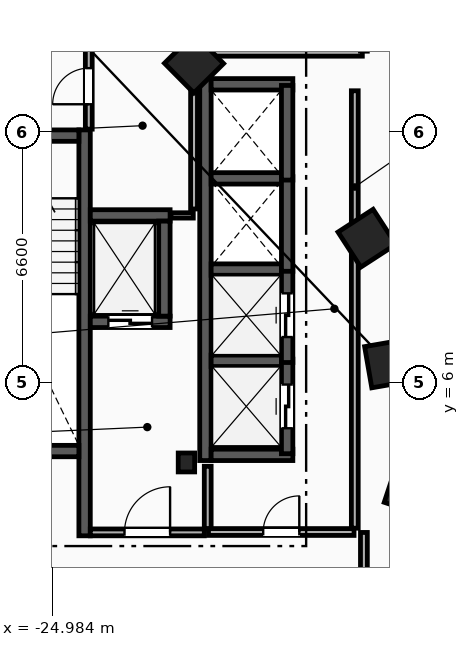
"""IFC4 building model, lengths in metres.
Left out: names, types, materials, properties, quantities, classifications, styles, units other than length and angle.
Written with IfcOpenShell. Run it as: python <this file> out.ifc"""

import sys

from ifc_helpers import new_model, si_unit, direction, frame, frame_2d, origin, origin_2d, place, context, subcontext, project, spatial, rectangle, i_section, extrude, element, fill, save


model = new_model("IFC4")
c1 = context("Model", 3, precision=1e-05, world=origin(), true_north=direction((0.0, 1.0)))
c2 = subcontext(c1, "Body", "Model", "MODEL_VIEW")
j1 = project(units=[si_unit("LENGTHUNIT", "METRE"), si_unit("PLANEANGLEUNIT", "RADIAN")], contexts=[c1])
p1 = place(None, origin())
s1 = spatial("IfcSite", under=j1, at=p1, CompositionType="ELEMENT")
p2 = place(p1, origin())
s2 = spatial("IfcBuilding", under=s1, at=p2, CompositionType="ELEMENT")
p3 = place(p2, frame((0.0, 0.0, 99.8)))
s3 = spatial("IfcBuildingStorey", under=s2, at=p3, CompositionType="ELEMENT", Elevation=99.8)
p4 = place(p3, frame((-21.45, 3.9, 0.0), z_axis=(0.0, 0.0, 1.0), x_axis=(1.0, 0.0, 0.0)))
e1 = element("IfcColumn", 1, at=p4, inside=s3, PredefinedType="COLUMN", context=c2, shape_type="SweptSolid", body=[
    extrude(i_section(OverallWidth=0.432, OverallDepth=0.498, WebThickness=0.056, FlangeThickness=0.089, FilletRadius=0.018, at=origin_2d()), origin(), (0.0, 0.0, 1.0), 3.6),
])
for number, where, z_axis, x_axis in (
    (2, (-15.55, 3.2, 0.0), (0.0, 0.0, 1.0), (0.315, 0.949, 0.0)),
    (3, (-16.125, 6.5, 0.0), (0.0, 0.0, 1.0), (-0.172, 0.985, 0.0)),
    (4, (-16.7, 9.8, 0.0), (0.0, 0.0, 1.0), (-0.544, 0.839, 0.0)),
    (5, (-21.25, 14.4, 0.0), (0.0, 0.0, 1.0), (-0.703, 0.711, 0.0)),
):
    element("IfcColumn", number, at=place(p3, frame(where, z_axis=z_axis, x_axis=x_axis)), inside=s3, PredefinedType="COLUMN", context=c2, shape_type="SweptSolid", body=[
        extrude(rectangle(XDim=1.1, YDim=1.1, at=origin_2d()), origin(), (0.0, 0.0, 1.0), 3.6),
    ])
p5 = place(p3, frame((-24.13, 1.97, 0.0), z_axis=(0.0, 0.0, 1.0), x_axis=(0.0, 1.0, 0.0)))
e6 = element("IfcWall", 6, at=p5, inside=s3, PredefinedType="SHEAR", context=c2, shape_type="SweptSolid", body=[
    extrude(rectangle(XDim=10.68, YDim=0.3, at=frame_2d((5.34, 0.0))), origin(), (0.0, 0.0, 1.0), 3.3),
])
p6 = place(p3, frame((-27.44, 12.5, 0.0), z_axis=(0.0, 0.0, 1.0), x_axis=(1.0, 0.0, 0.0)))
e7 = element("IfcWall", 7, at=p6, inside=s3, PredefinedType="SHEAR", context=c2, shape_type="SweptSolid", body=[
    extrude(rectangle(XDim=3.16, YDim=0.3, at=frame_2d((1.58, 0.0))), origin(), (0.0, 0.0, 1.0), 3.3),
])
p7 = place(p6, frame((1.03, 0.0, 0.0)))
e8 = element("IfcOpeningElement", 8, at=p7, cuts=e7, PredefinedType="OPENING", context=c2, shape_type="SweptSolid", body=[
    extrude(rectangle(XDim=1.1, YDim=2.15, at=frame_2d((0.55, 1.075))), frame((0.0, 0.16, 0.0), z_axis=(0.0, -1.0, 0.0), x_axis=(1.0, 0.0, 0.0)), (0.0, 0.0, 1.0), 0.32),
])
p8 = place(p3, frame((-27.44, 4.2, 0.0), z_axis=(0.0, 0.0, 1.0), x_axis=(1.0, 0.0, 0.0)))
e9 = element("IfcWall", 9, at=p8, inside=s3, PredefinedType="SHEAR", context=c2, shape_type="SweptSolid", body=[
    extrude(rectangle(XDim=3.16, YDim=0.3, at=frame_2d((1.58, 0.0))), origin(), (0.0, 0.0, 1.0), 3.3),
])
p9 = place(p3, frame((-20.89, 2.15, 0.0), z_axis=(0.0, 0.0, 1.0), x_axis=(0.0, 1.0, 0.0)))
e10 = element("IfcWall", 10, at=p9, inside=s3, PredefinedType="PARTITIONING", context=c2, shape_type="SweptSolid", body=[
    extrude(rectangle(XDim=1.65, YDim=0.18, at=frame_2d((0.825, 0.0))), origin(), (0.0, 0.0, 1.0), 3.3),
])
p10 = place(p3, frame((-23.98, 2.06, 0.0), z_axis=(0.0, 0.0, 1.0), x_axis=(1.0, 0.0, 0.0)))
e11 = element("IfcWall", 11, at=p10, inside=s3, PredefinedType="PARTITIONING", context=c2, shape_type="SweptSolid", body=[
    extrude(rectangle(XDim=3.0, YDim=0.18, at=frame_2d((1.5, 0.0))), origin(), (0.0, 0.0, 1.0), 3.3),
])
p11 = place(p10, frame((0.9, 0.0, 0.0)))
e12 = element("IfcOpeningElement", 12, at=p11, cuts=e11, PredefinedType="OPENING", context=c2, shape_type="SweptSolid", body=[
    extrude(rectangle(XDim=1.2, YDim=2.15, at=frame_2d((0.6, 1.075))), frame((0.0, 0.1, 0.0), z_axis=(0.0, -1.0, 0.0), x_axis=(1.0, 0.0, 0.0)), (0.0, 0.0, 1.0), 0.2),
])
p12 = place(p3, frame((-23.98, 7.6, 0.0), z_axis=(0.0, 0.0, 1.0), x_axis=(1.0, 0.0, 0.0)))
e13 = element("IfcWall", 13, at=p12, inside=s3, PredefinedType="SHEAR", context=c2, shape_type="SweptSolid", body=[
    extrude(rectangle(XDim=2.1, YDim=0.3, at=frame_2d((1.05, 0.0))), origin(), (0.0, 0.0, 1.0), 3.3),
])
p13 = place(p12, frame((0.475, 0.0, 0.0)))
e14 = element("IfcOpeningElement", 14, at=p13, cuts=e13, PredefinedType="OPENING", context=c2, shape_type="SweptSolid", body=[
    extrude(rectangle(XDim=1.15, YDim=2.2, at=frame_2d((0.575, 1.1))), frame((0.0, 0.16, 0.0), z_axis=(0.0, -1.0, 0.0), x_axis=(1.0, 0.0, 0.0)), (0.0, 0.0, 1.0), 0.32),
])
p14 = place(p3, frame((-23.98, 10.4, 0.0), z_axis=(0.0, 0.0, 1.0), x_axis=(1.0, 0.0, 0.0)))
e15 = element("IfcWall", 15, at=p14, inside=s3, PredefinedType="SHEAR", context=c2, shape_type="SweptSolid", body=[
    extrude(rectangle(XDim=2.1, YDim=0.3, at=frame_2d((1.05, 0.0))), origin(), (0.0, 0.0, 1.0), 3.3),
])
p15 = place(p3, frame((-22.03, 7.75, 0.0), z_axis=(0.0, 0.0, 1.0), x_axis=(0.0, 1.0, 0.0)))
e16 = element("IfcWall", 16, at=p15, inside=s3, PredefinedType="SHEAR", context=c2, shape_type="SweptSolid", body=[
    extrude(rectangle(XDim=2.5, YDim=0.3, at=frame_2d((1.25, 0.0))), origin(), (0.0, 0.0, 1.0), 3.3),
])
p16 = place(p3, frame((-20.95, 3.95, 0.0), z_axis=(0.0, 0.0, 1.0), x_axis=(0.0, 1.0, 0.0)))
e17 = element("IfcWall", 17, at=p16, inside=s3, PredefinedType="SHEAR", context=c2, shape_type="SweptSolid", body=[
    extrude(rectangle(XDim=10.05, YDim=0.3, at=frame_2d((5.025, 0.0))), origin(), (0.0, 0.0, 1.0), 3.3),
])
for number, where, z_axis, x_axis in (
    (18, (-20.8, 4.1, 0.0), (0.0, 0.0, 1.0), (1.0, 0.0, 0.0)),
    (19, (-20.8, 13.85, 0.0), (0.0, 0.0, 1.0), (1.0, 0.0, 0.0)),
):
    element("IfcWall", number, at=place(p3, frame(where, z_axis=z_axis, x_axis=x_axis)), inside=s3, PredefinedType="SHEAR", context=c2, shape_type="SweptSolid", body=[
        extrude(rectangle(XDim=2.15, YDim=0.3, at=frame_2d((1.075, 0.0))), origin(), (0.0, 0.0, 1.0), 3.3),
    ])
for number, where, z_axis, x_axis in (
    (20, (-20.8, 6.575, 0.0), (0.0, 0.0, 1.0), (1.0, 0.0, 0.0)),
    (21, (-20.8, 8.975, 0.0), (0.0, 0.0, 1.0), (1.0, 0.0, 0.0)),
    (22, (-20.8, 11.375, 0.0), (0.0, 0.0, 1.0), (1.0, 0.0, 0.0)),
):
    element("IfcWall", number, at=place(p3, frame(where, z_axis=z_axis, x_axis=x_axis)), inside=s3, PredefinedType="SHEAR", context=c2, shape_type="SweptSolid", body=[
        extrude(rectangle(XDim=1.85, YDim=0.3, at=frame_2d((0.925, 0.0))), origin(), (0.0, 0.0, 1.0), 3.3),
    ])
p17 = place(p3, frame((-18.8, 4.13, 0.0), z_axis=(0.0, 0.0, 1.0), x_axis=(0.0, 1.0, 0.0)))
e23 = element("IfcWall", 23, at=p17, inside=s3, PredefinedType="SHEAR", context=c2, shape_type="SweptSolid", body=[
    extrude(rectangle(XDim=2.49, YDim=0.3, at=frame_2d((1.245, 0.0))), origin(), (0.0, 0.0, 1.0), 3.3),
])
p18 = place(p17, frame((0.67, 0.0, 0.0)))
e24 = element("IfcOpeningElement", 24, at=p18, cuts=e23, PredefinedType="OPENING", context=c2, shape_type="SweptSolid", body=[
    extrude(rectangle(XDim=1.15, YDim=2.2, at=frame_2d((0.575, 1.1))), frame((0.0, 0.16, 0.0), z_axis=(0.0, -1.0, 0.0), x_axis=(1.0, 0.0, 0.0)), (0.0, 0.0, 1.0), 0.32),
])
p19 = place(p3, frame((-18.8, 6.53, 0.0), z_axis=(0.0, 0.0, 1.0), x_axis=(0.0, 1.0, 0.0)))
e25 = element("IfcWall", 25, at=p19, inside=s3, PredefinedType="SHEAR", context=c2, shape_type="SweptSolid", body=[
    extrude(rectangle(XDim=2.49, YDim=0.3, at=frame_2d((1.245, 0.0))), origin(), (0.0, 0.0, 1.0), 3.3),
])
p20 = place(p19, frame((0.67, 0.0, 0.0)))
e26 = element("IfcOpeningElement", 26, at=p20, cuts=e25, PredefinedType="OPENING", context=c2, shape_type="SweptSolid", body=[
    extrude(rectangle(XDim=1.15, YDim=2.2, at=frame_2d((0.575, 1.1))), frame((0.0, 0.16, 0.0), z_axis=(0.0, -1.0, 0.0), x_axis=(1.0, 0.0, 0.0)), (0.0, 0.0, 1.0), 0.32),
])
for number, where, z_axis, x_axis in (
    (27, (-18.8, 8.93, 0.0), (0.0, 0.0, 1.0), (0.0, 1.0, 0.0)),
    (28, (-18.8, 11.33, 0.0), (0.0, 0.0, 1.0), (0.0, 1.0, 0.0)),
):
    element("IfcWall", number, at=place(p3, frame(where, z_axis=z_axis, x_axis=x_axis)), inside=s3, PredefinedType="SHEAR", context=c2, shape_type="SweptSolid", body=[
        extrude(rectangle(XDim=2.49, YDim=0.3, at=frame_2d((1.245, 0.0))), origin(), (0.0, 0.0, 1.0), 3.3),
    ])
p21 = place(p3, frame((-17.02, 2.17, 0.0), z_axis=(0.0, 0.0, 1.0), x_axis=(0.0, 1.0, 0.0)))
e29 = element("IfcWall", 29, at=p21, inside=s3, PredefinedType="PARTITIONING", context=c2, shape_type="SweptSolid", body=[
    extrude(rectangle(XDim=11.51, YDim=0.18, at=frame_2d((5.755, 0.0))), origin(), (0.0, 0.0, 1.0), 3.3),
])
p22 = place(p3, frame((-20.87, 2.07, 0.0), z_axis=(0.0, 0.0, 1.0), x_axis=(1.0, 0.0, 0.0)))
e30 = element("IfcWall", 30, at=p22, inside=s3, PredefinedType="PARTITIONING", context=c2, shape_type="SweptSolid", body=[
    extrude(rectangle(XDim=3.83, YDim=0.18, at=frame_2d((1.915, 0.0))), origin(), (0.0, 0.0, 1.0), 3.3),
])
p23 = place(p22, frame((1.44, 0.0, 0.0)))
e31 = element("IfcOpeningElement", 31, at=p23, cuts=e30, PredefinedType="OPENING", context=c2, shape_type="SweptSolid", body=[
    extrude(rectangle(XDim=0.95, YDim=2.1, at=frame_2d((0.475, 1.05))), frame((0.0, 0.1, 0.0), z_axis=(0.0, -1.0, 0.0), x_axis=(1.0, 0.0, 0.0)), (0.0, 0.0, 1.0), 0.2),
])
p24 = place(p3, frame((-21.86, 10.4, 0.0), z_axis=(0.0, 0.0, 1.0), x_axis=(1.0, 0.0, 0.0)))
e32 = element("IfcWall", 32, at=p24, inside=s3, PredefinedType="PARTITIONING", context=c2, shape_type="SweptSolid", body=[
    extrude(rectangle(XDim=0.59, YDim=0.14, at=frame_2d((0.295, 0.0))), origin(), (0.0, 0.0, 1.0), 3.3),
])
p25 = place(p3, frame((-21.25, 10.57, 0.0), z_axis=(0.0, 0.0, 1.0), x_axis=(0.0, 1.0, 0.0)))
e33 = element("IfcWall", 33, at=p25, inside=s3, PredefinedType="PARTITIONING", context=c2, shape_type="SweptSolid", body=[
    extrude(rectangle(XDim=4.36, YDim=0.18, at=frame_2d((2.18, 0.0))), origin(), (0.0, 0.0, 1.0), 3.3),
])
p26 = place(p3, frame((-24.02, 12.67, 0.0), z_axis=(0.0, 0.0, 1.0), x_axis=(0.0, 1.0, 0.0)))
e34 = element("IfcWall", 34, at=p26, inside=s3, PredefinedType="PARTITIONING", context=c2, shape_type="SweptSolid", body=[
    extrude(rectangle(XDim=2.26, YDim=0.18, at=frame_2d((1.13, 0.0))), origin(), (0.0, 0.0, 1.0), 3.3),
])
p27 = place(p26, frame((0.655, 0.0, 0.0)))
e35 = element("IfcOpeningElement", 35, at=p27, cuts=e34, PredefinedType="OPENING", context=c2, shape_type="SweptSolid", body=[
    extrude(rectangle(XDim=0.95, YDim=2.1, at=frame_2d((0.475, 1.05))), frame((0.0, 0.1, 0.0), z_axis=(0.0, -1.0, 0.0), x_axis=(1.0, 0.0, 0.0)), (0.0, 0.0, 1.0), 0.2),
])
p28 = place(p3, frame((-21.178, 14.68, 0.0), z_axis=(0.0, 0.0, 1.0), x_axis=(1.0, 0.0, 0.0)))
e36 = element("IfcWall", 36, at=p28, inside=s3, PredefinedType="PARTITIONING", context=c2, shape_type="SweptSolid", body=[
    extrude(rectangle(XDim=4.357, YDim=0.18, at=frame_2d((2.178, 0.0))), origin(), (0.0, 0.0, 1.0), 3.3),
])
p29 = place(p3, frame((-16.78, -0.329, 0.0), z_axis=(0.0, 0.0, 1.0), x_axis=(0.0, 1.0, 0.0)))
e37 = element("IfcWall", 37, at=p29, inside=s3, PredefinedType="PARTITIONING", context=c2, shape_type="SweptSolid", body=[
    extrude(rectangle(XDim=2.387, YDim=0.18, at=frame_2d((1.194, 0.0))), origin(), (0.0, 0.0, 1.0), 3.3),
])
p30 = place(p11, origin())
e38 = element("IfcDoor", 38, at=p30, inside=s3, OperationType="SINGLE_SWING_RIGHT", PredefinedType="DOOR", context=c2, shape_type="SweptSolid", body=[
    extrude(rectangle(XDim=1.2, YDim=2.15, at=frame_2d((0.6, 1.075))), frame((0.0, 0.025, 0.0), z_axis=(0.0, -1.0, 0.0), x_axis=(1.0, 0.0, 0.0)), (0.0, 0.0, 1.0), 0.05),
])
fill(e12, e38)
p31 = place(p13, origin())
e39 = element("IfcDoor", 39, at=p31, inside=s3, OperationType="SLIDING_TO_LEFT", PredefinedType="TRAPDOOR", context=c2, shape_type="SweptSolid", body=[
    extrude(rectangle(XDim=1.15, YDim=2.2, at=frame_2d((0.575, 1.1))), frame((0.0, 0.025, 0.0), z_axis=(0.0, -1.0, 0.0), x_axis=(1.0, 0.0, 0.0)), (0.0, 0.0, 1.0), 0.05),
])
fill(e14, e39)
p32 = place(p18, origin())
e40 = element("IfcDoor", 40, at=p32, inside=s3, OperationType="SLIDING_TO_LEFT", PredefinedType="TRAPDOOR", context=c2, shape_type="SweptSolid", body=[
    extrude(rectangle(XDim=1.15, YDim=2.2, at=frame_2d((0.575, 1.1))), frame((0.0, 0.025, 0.0), z_axis=(0.0, -1.0, 0.0), x_axis=(1.0, 0.0, 0.0)), (0.0, 0.0, 1.0), 0.05),
])
fill(e24, e40)
p33 = place(p20, origin())
e41 = element("IfcDoor", 41, at=p33, inside=s3, OperationType="SLIDING_TO_LEFT", PredefinedType="TRAPDOOR", context=c2, shape_type="SweptSolid", body=[
    extrude(rectangle(XDim=1.15, YDim=2.2, at=frame_2d((0.575, 1.1))), frame((0.0, 0.025, 0.0), z_axis=(0.0, -1.0, 0.0), x_axis=(1.0, 0.0, 0.0)), (0.0, 0.0, 1.0), 0.05),
])
fill(e26, e41)
p34 = place(p23, origin())
e42 = element("IfcDoor", 42, at=p34, inside=s3, OperationType="SINGLE_SWING_RIGHT", PredefinedType="DOOR", context=c2, shape_type="SweptSolid", body=[
    extrude(rectangle(XDim=0.95, YDim=2.1, at=frame_2d((0.475, 1.05))), frame((0.0, 0.025, 0.0), z_axis=(0.0, -1.0, 0.0), x_axis=(1.0, 0.0, 0.0)), (0.0, 0.0, 1.0), 0.05),
])
fill(e31, e42)
p35 = place(p27, origin())
e43 = element("IfcDoor", 43, at=p35, inside=s3, OperationType="SINGLE_SWING_LEFT", PredefinedType="DOOR", context=c2, shape_type="SweptSolid", body=[
    extrude(rectangle(XDim=0.95, YDim=2.1, at=frame_2d((0.475, 1.05))), frame((0.0, 0.025, 0.0), z_axis=(0.0, -1.0, 0.0), x_axis=(1.0, 0.0, 0.0)), (0.0, 0.0, 1.0), 0.05),
])
fill(e35, e43)
save(model, sys.argv[1])
